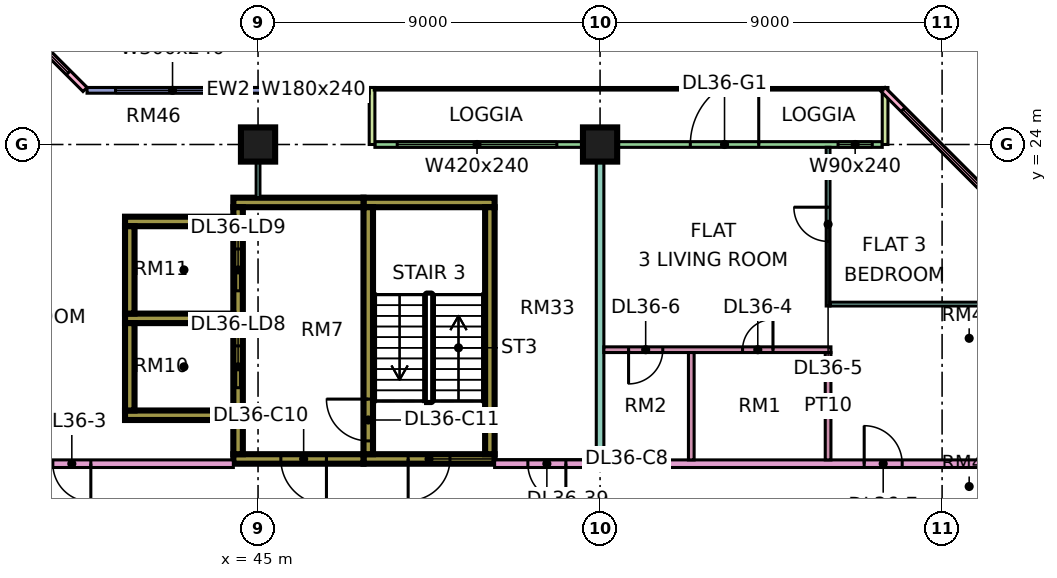
"""IFC4 building model, lengths in metres.
Left out: names, types, materials, properties, quantities, classifications, styles, units other than length and angle.
Written with IfcOpenShell. Run it as: python <this file> out.ifc"""

import sys

from ifc_helpers import new_model, si_unit, direction, frame, frame_2d, origin, origin_2d, place, context, subcontext, project, spatial, rectangle, extrude, element, fill, save


model = new_model("IFC4")
c1 = context("Model", 3, precision=1e-05, world=origin(), true_north=direction((0.0, 1.0)))
c2 = subcontext(c1, "Body", "Model", "MODEL_VIEW")
j1 = project(units=[si_unit("LENGTHUNIT", "METRE"), si_unit("PLANEANGLEUNIT", "RADIAN")], contexts=[c1])
p1 = place(None, origin())
s1 = spatial("IfcSite", under=j1, at=p1, CompositionType="ELEMENT")
p2 = place(p1, origin())
s2 = spatial("IfcBuilding", under=s1, at=p2, CompositionType="ELEMENT")
p3 = place(p2, frame((0.0, 0.0, 161.15)))
s3 = spatial("IfcBuildingStorey", under=s2, at=p3, CompositionType="ELEMENT", Elevation=161.15)
for number, where, z_axis, x_axis in (
    (1, (45.0, 24.0, 0.0), (0.0, 0.0, 1.0), (1.0, 0.0, 0.0)),
    (2, (54.0, 24.0, 0.0), (0.0, 0.0, 1.0), (1.0, 0.0, 0.0)),
):
    element("IfcColumn", number, at=place(p3, frame(where, z_axis=z_axis, x_axis=x_axis)), inside=s3, PredefinedType="COLUMN", context=c2, shape_type="SweptSolid", body=[
        extrude(rectangle(XDim=0.9, YDim=0.9, at=origin_2d()), origin(), (0.0, 0.0, 1.0), 3.75),
    ])
p4 = place(p3, frame((47.775, 15.725, 0.0), z_axis=(0.0, 0.0, 1.0), x_axis=(1.0, 0.0, 0.0)))
e3 = element("IfcWall", 3, at=p4, inside=s3, PredefinedType="SHEAR", context=c2, shape_type="SweptSolid", body=[
    extrude(rectangle(XDim=3.45, YDim=0.25, at=frame_2d((1.725, 0.0))), origin(), (0.0, 0.0, 1.0), 3.75),
])
p5 = place(p4, frame((1.175, 0.0, 0.0)))
e4 = element("IfcOpeningElement", 4, at=p5, cuts=e3, PredefinedType="OPENING", context=c2, shape_type="SweptSolid", body=[
    extrude(rectangle(XDim=1.1, YDim=2.2, at=frame_2d((0.55, 1.1))), frame((0.0, 0.135, 0.0), z_axis=(0.0, -1.0, 0.0), x_axis=(1.0, 0.0, 0.0)), (0.0, 0.0, 1.0), 0.27),
])
p6 = place(p3, frame((47.775, 22.475, 0.0), z_axis=(0.0, 0.0, 1.0), x_axis=(1.0, 0.0, 0.0)))
e5 = element("IfcWall", 5, at=p6, inside=s3, PredefinedType="SHEAR", context=c2, shape_type="SweptSolid", body=[
    extrude(rectangle(XDim=3.45, YDim=0.25, at=frame_2d((1.725, 0.0))), origin(), (0.0, 0.0, 1.0), 3.75),
])
p7 = place(p3, frame((47.9, 15.85, 0.0), z_axis=(0.0, 0.0, 1.0), x_axis=(0.0, 1.0, 0.0)))
e6 = element("IfcWall", 6, at=p7, inside=s3, PredefinedType="SHEAR", context=c2, shape_type="SweptSolid", body=[
    extrude(rectangle(XDim=6.5, YDim=0.25, at=frame_2d((3.25, 0.0))), origin(), (0.0, 0.0, 1.0), 3.75),
])
p8 = place(p7, frame((0.35, 0.0, 0.0)))
e7 = element("IfcOpeningElement", 7, at=p8, cuts=e6, PredefinedType="OPENING", context=c2, shape_type="SweptSolid", body=[
    extrude(rectangle(XDim=1.1, YDim=2.2, at=frame_2d((0.55, 1.1))), frame((0.0, 0.135, 0.0), z_axis=(0.0, -1.0, 0.0), x_axis=(1.0, 0.0, 0.0)), (0.0, 0.0, 1.0), 0.27),
])
p9 = place(p3, frame((51.1, 15.85, 0.0), z_axis=(0.0, 0.0, 1.0), x_axis=(0.0, 1.0, 0.0)))
e8 = element("IfcWall", 8, at=p9, inside=s3, PredefinedType="SHEAR", context=c2, shape_type="SweptSolid", body=[
    extrude(rectangle(XDim=6.5, YDim=0.25, at=frame_2d((3.25, 0.0))), origin(), (0.0, 0.0, 1.0), 3.75),
])
p10 = place(p3, frame((44.35, 15.725, 0.0), z_axis=(0.0, 0.0, 1.0), x_axis=(1.0, 0.0, 0.0)))
e9 = element("IfcWall", 9, at=p10, inside=s3, PredefinedType="SHEAR", context=c2, shape_type="SweptSolid", body=[
    extrude(rectangle(XDim=3.425, YDim=0.25, at=frame_2d((1.712, 0.0))), origin(), (0.0, 0.0, 1.0), 3.75),
])
p11 = place(p10, frame((1.25, 0.0, 0.0)))
e10 = element("IfcOpeningElement", 10, at=p11, cuts=e9, PredefinedType="OPENING", context=c2, shape_type="SweptSolid", body=[
    extrude(rectangle(XDim=1.2, YDim=2.2, at=frame_2d((0.6, 1.1))), frame((0.0, 0.135, 0.0), z_axis=(0.0, -1.0, 0.0), x_axis=(1.0, 0.0, 0.0)), (0.0, 0.0, 1.0), 0.27),
])
p12 = place(p3, frame((44.35, 22.475, 0.0), z_axis=(0.0, 0.0, 1.0), x_axis=(1.0, 0.0, 0.0)))
e11 = element("IfcWall", 11, at=p12, inside=s3, PredefinedType="SHEAR", context=c2, shape_type="SweptSolid", body=[
    extrude(rectangle(XDim=3.425, YDim=0.25, at=frame_2d((1.712, 0.0))), origin(), (0.0, 0.0, 1.0), 3.75),
])
p13 = place(p3, frame((44.475, 15.85, 0.0), z_axis=(0.0, 0.0, 1.0), x_axis=(0.0, 1.0, 0.0)))
e12 = element("IfcWall", 12, at=p13, inside=s3, PredefinedType="SHEAR", context=c2, shape_type="SweptSolid", body=[
    extrude(rectangle(XDim=6.5, YDim=0.25, at=frame_2d((3.25, 0.0))), origin(), (0.0, 0.0, 1.0), 3.75),
])
p14 = place(p13, frame((1.75, 0.0, 0.0)))
e13 = element("IfcOpeningElement", 13, at=p14, cuts=e12, PredefinedType="OPENING", context=c2, shape_type="SweptSolid", body=[
    extrude(rectangle(XDim=1.1, YDim=2.2, at=frame_2d((0.55, 1.1))), frame((0.0, 0.135, 0.0), z_axis=(0.0, -1.0, 0.0), x_axis=(1.0, 0.0, 0.0)), (0.0, 0.0, 1.0), 0.27),
])
p15 = place(p13, frame((4.3, 0.0, 0.0)))
e14 = element("IfcOpeningElement", 14, at=p15, cuts=e12, PredefinedType="OPENING", context=c2, shape_type="SweptSolid", body=[
    extrude(rectangle(XDim=1.1, YDim=2.2, at=frame_2d((0.55, 1.1))), frame((0.0, 0.135, 0.0), z_axis=(0.0, -1.0, 0.0), x_axis=(1.0, 0.0, 0.0)), (0.0, 0.0, 1.0), 0.27),
])
for number, where, z_axis, x_axis in (
    (15, (41.5, 16.875, 0.0), (0.0, 0.0, 1.0), (1.0, 0.0, 0.0)),
    (16, (41.5, 19.425, 0.0), (0.0, 0.0, 1.0), (1.0, 0.0, 0.0)),
    (17, (41.5, 21.975, 0.0), (0.0, 0.0, 1.0), (1.0, 0.0, 0.0)),
):
    element("IfcWall", number, at=place(p3, frame(where, z_axis=z_axis, x_axis=x_axis)), inside=s3, PredefinedType="SHEAR", context=c2, shape_type="SweptSolid", body=[
        extrude(rectangle(XDim=2.85, YDim=0.25, at=frame_2d((1.425, 0.0))), origin(), (0.0, 0.0, 1.0), 3.75),
    ])
for number, where, z_axis, x_axis in (
    (18, (41.625, 17.0, 0.0), (0.0, 0.0, 1.0), (0.0, 1.0, 0.0)),
    (19, (41.625, 19.55, 0.0), (0.0, 0.0, 1.0), (0.0, 1.0, 0.0)),
):
    element("IfcWall", number, at=place(p3, frame(where, z_axis=z_axis, x_axis=x_axis)), inside=s3, PredefinedType="SHEAR", context=c2, shape_type="SweptSolid", body=[
        extrude(rectangle(XDim=2.3, YDim=0.25, at=frame_2d((1.15, 0.0))), origin(), (0.0, 0.0, 1.0), 3.75),
    ])
p16 = place(p3, frame((61.425, 24.0, 0.0), z_axis=(0.0, 0.0, 1.0), x_axis=(-1.0, 0.0, 0.0)))
e20 = element("IfcWall", 20, at=p16, inside=s3, PredefinedType="SOLIDWALL", context=c2, shape_type="SweptSolid", body=[
    extrude(rectangle(XDim=13.35, YDim=0.15, at=frame_2d((6.675, 0.0))), origin(), (0.0, 0.0, 1.0), 3.35),
])
p17 = place(p16, frame((0.262, 0.0, 0.45)))
e21 = element("IfcOpeningElement", 21, at=p17, cuts=e20, PredefinedType="OPENING", context=c2, shape_type="SweptSolid", body=[
    extrude(rectangle(XDim=0.9, YDim=2.4, at=frame_2d((0.45, 1.2))), frame((0.0, 0.085, 0.0), z_axis=(0.0, -1.0, 0.0), x_axis=(1.0, 0.0, 0.0)), (0.0, 0.0, 1.0), 0.17),
])
p18 = place(p16, frame((3.25, 0.0, 0.0)))
e22 = element("IfcOpeningElement", 22, at=p18, cuts=e20, PredefinedType="OPENING", context=c2, shape_type="SweptSolid", body=[
    extrude(rectangle(XDim=1.8, YDim=2.4, at=frame_2d((0.9, 1.2))), frame((0.0, 0.085, 0.0), z_axis=(0.0, -1.0, 0.0), x_axis=(1.0, 0.0, 0.0)), (0.0, 0.0, 1.0), 0.17),
])
p19 = place(p16, frame((8.562, 0.0, 0.45)))
e23 = element("IfcOpeningElement", 23, at=p19, cuts=e20, PredefinedType="OPENING", context=c2, shape_type="SweptSolid", body=[
    extrude(rectangle(XDim=4.2, YDim=2.4, at=frame_2d((2.1, 1.2))), frame((0.0, 0.085, 0.0), z_axis=(0.0, -1.0, 0.0), x_axis=(1.0, 0.0, 0.0)), (0.0, 0.0, 1.0), 0.17),
])
for number, where, z_axis, x_axis in (
    (24, (61.5, 25.5, 0.0), (0.0, 0.0, 1.0), (0.0, -1.0, 0.0)),
    (25, (48.0, 25.5, 0.0), (0.0, 0.0, 1.0), (0.0, -1.0, 0.0)),
):
    element("IfcWall", number, at=place(p3, frame(where, z_axis=z_axis, x_axis=x_axis)), inside=s3, PredefinedType="SOLIDWALL", context=c2, shape_type="SweptSolid", body=[
        extrude(rectangle(XDim=1.5, YDim=0.15, at=frame_2d((0.75, 0.0))), origin(), (0.0, 0.0, 1.0), 3.35),
    ])
p20 = place(p3, frame((47.925, 25.425, 0.0), z_axis=(0.0, 0.0, 1.0), x_axis=(-1.0, 0.0, 0.0)))
e26 = element("IfcWall", 26, at=p20, inside=s3, PredefinedType="SOLIDWALL", context=c2, shape_type="SweptSolid", body=[
    extrude(rectangle(XDim=7.425, YDim=0.15, at=frame_2d((3.712, 0.0))), origin(), (0.0, 0.0, 1.0), 3.35),
])
p21 = place(p20, frame((0.562, 0.0, 0.45)))
e27 = element("IfcOpeningElement", 27, at=p21, cuts=e26, PredefinedType="OPENING", context=c2, shape_type="SweptSolid", body=[
    extrude(rectangle(XDim=1.8, YDim=2.4, at=frame_2d((0.9, 1.2))), frame((0.0, 0.085, 0.0), z_axis=(0.0, -1.0, 0.0), x_axis=(1.0, 0.0, 0.0)), (0.0, 0.0, 1.0), 0.17),
])
p22 = place(p20, frame((3.675, 0.0, 0.45)))
e28 = element("IfcOpeningElement", 28, at=p22, cuts=e26, PredefinedType="OPENING", context=c2, shape_type="SweptSolid", body=[
    extrude(rectangle(XDim=3.0, YDim=2.4, at=frame_2d((1.5, 1.2))), frame((0.0, 0.085, 0.0), z_axis=(0.0, -1.0, 0.0), x_axis=(1.0, 0.0, 0.0)), (0.0, 0.0, 1.0), 0.17),
])
p23 = place(p3, frame((40.447, 25.447, 0.0), z_axis=(0.0, 0.0, 1.0), x_axis=(-0.707106781187, 0.707106781187, 0.0)))
e29 = element("IfcWall", 29, at=p23, inside=s3, PredefinedType="SOLIDWALL", context=c2, shape_type="SweptSolid", body=[
    extrude(rectangle(XDim=4.243, YDim=0.15, at=frame_2d((2.121, 0.0))), origin(), (0.0, 0.0, 1.0), 3.35),
])
p24 = place(p23, frame((0.621, 0.0, 0.45)))
e30 = element("IfcOpeningElement", 30, at=p24, cuts=e29, PredefinedType="OPENING", context=c2, shape_type="SweptSolid", body=[
    extrude(rectangle(XDim=3.0, YDim=2.4, at=frame_2d((1.5, 1.2))), frame((0.0, 0.085, 0.0), z_axis=(0.0, -1.0, 0.0), x_axis=(1.0, 0.0, 0.0)), (0.0, 0.0, 1.0), 0.17),
])
p25 = place(p3, frame((64.447, 22.447, 0.0), z_axis=(0.0, 0.0, 1.0), x_axis=(-0.707106781187, 0.707106781187, 0.0)))
e31 = element("IfcWall", 31, at=p25, inside=s3, PredefinedType="SOLIDWALL", context=c2, shape_type="SweptSolid", body=[
    extrude(rectangle(XDim=4.243, YDim=0.15, at=frame_2d((2.121, 0.0))), origin(), (0.0, 0.0, 1.0), 3.35),
])
p26 = place(p25, frame((0.498, 0.0, 0.45)))
e32 = element("IfcOpeningElement", 32, at=p26, cuts=e31, PredefinedType="OPENING", context=c2, shape_type="SweptSolid", body=[
    extrude(rectangle(XDim=3.0, YDim=2.4, at=frame_2d((1.5, 1.2))), frame((0.0, 0.085, 0.0), z_axis=(0.0, -1.0, 0.0), x_axis=(1.0, 0.0, 0.0)), (0.0, 0.0, 1.0), 0.17),
])
p27 = place(p3, frame((34.0, 15.6, 0.0), z_axis=(0.0, 0.0, 1.0), x_axis=(1.0, 0.0, 0.0)))
e33 = element("IfcWall", 33, at=p27, inside=s3, PredefinedType="PARTITIONING", context=c2, shape_type="SweptSolid", body=[
    extrude(rectangle(XDim=10.35, YDim=0.2, at=frame_2d((5.175, 0.0))), origin(), (0.0, 0.0, 1.0), 3.35),
])
p28 = place(p27, frame((5.6, 0.0, 0.0)))
e34 = element("IfcOpeningElement", 34, at=p28, cuts=e33, PredefinedType="OPENING", context=c2, shape_type="SweptSolid", body=[
    extrude(rectangle(XDim=1.0, YDim=2.1, at=frame_2d((0.5, 1.05))), frame((0.0, 0.11, 0.0), z_axis=(0.0, -1.0, 0.0), x_axis=(1.0, 0.0, 0.0)), (0.0, 0.0, 1.0), 0.22),
])
p29 = place(p27, frame((0.45, 0.0, 0.0)))
e35 = element("IfcOpeningElement", 35, at=p29, cuts=e33, PredefinedType="OPENING", context=c2, shape_type="SweptSolid", body=[
    extrude(rectangle(XDim=1.2, YDim=2.1, at=frame_2d((0.6, 1.05))), frame((0.0, 0.11, 0.0), z_axis=(0.0, -1.0, 0.0), x_axis=(1.0, 0.0, 0.0)), (0.0, 0.0, 1.0), 0.22),
])
p30 = place(p3, frame((45.0, 22.6, 0.0), z_axis=(0.0, 0.0, 1.0), x_axis=(0.0, 1.0, 0.0)))
e36 = element("IfcWall", 36, at=p30, inside=s3, PredefinedType="PARTITIONING", context=c2, shape_type="SweptSolid", body=[
    extrude(rectangle(XDim=1.4, YDim=0.1, at=frame_2d((0.7, 0.0))), origin(), (0.0, 0.0, 1.0), 3.35),
])
p31 = place(p3, frame((51.225, 15.6, 0.0), z_axis=(0.0, 0.0, 1.0), x_axis=(1.0, 0.0, 0.0)))
e37 = element("IfcWall", 37, at=p31, inside=s3, PredefinedType="PARTITIONING", context=c2, shape_type="SweptSolid", body=[
    extrude(rectangle(XDim=13.125, YDim=0.2, at=frame_2d((6.562, 0.0))), origin(), (0.0, 0.0, 1.0), 3.35),
])
p32 = place(p31, frame((9.725, 0.0, 0.0)))
e38 = element("IfcOpeningElement", 38, at=p32, cuts=e37, PredefinedType="OPENING", context=c2, shape_type="SweptSolid", body=[
    extrude(rectangle(XDim=1.0, YDim=2.1, at=frame_2d((0.5, 1.05))), frame((0.0, 0.11, 0.0), z_axis=(0.0, -1.0, 0.0), x_axis=(1.0, 0.0, 0.0)), (0.0, 0.0, 1.0), 0.22),
])
p33 = place(p31, frame((0.875, 0.0, 0.0)))
e39 = element("IfcOpeningElement", 39, at=p33, cuts=e37, PredefinedType="OPENING", context=c2, shape_type="SweptSolid", body=[
    extrude(rectangle(XDim=1.0, YDim=2.1, at=frame_2d((0.5, 1.05))), frame((0.0, 0.11, 0.0), z_axis=(0.0, -1.0, 0.0), x_axis=(1.0, 0.0, 0.0)), (0.0, 0.0, 1.0), 0.22),
])
p34 = place(p3, frame((54.0, 15.7, 0.0), z_axis=(0.0, 0.0, 1.0), x_axis=(0.0, 1.0, 0.0)))
e40 = element("IfcWall", 40, at=p34, inside=s3, PredefinedType="PARTITIONING", context=c2, shape_type="SweptSolid", body=[
    extrude(rectangle(XDim=8.226, YDim=0.2, at=frame_2d((4.113, 0.0))), origin(), (0.0, 0.0, 1.0), 3.35),
])
p35 = place(p3, frame((54.1, 18.6, 0.0), z_axis=(0.0, 0.0, 1.0), x_axis=(1.0, 0.0, 0.0)))
e41 = element("IfcWall", 41, at=p35, inside=s3, PredefinedType="PARTITIONING", context=c2, shape_type="SweptSolid", body=[
    extrude(rectangle(XDim=5.975, YDim=0.15, at=frame_2d((2.987, 0.0))), origin(), (0.0, 0.0, 1.0), 3.35),
])
p36 = place(p35, frame((3.65, 0.0, 0.0)))
e42 = element("IfcOpeningElement", 42, at=p36, cuts=e41, PredefinedType="OPENING", context=c2, shape_type="SweptSolid", body=[
    extrude(rectangle(XDim=0.8, YDim=2.1, at=frame_2d((0.4, 1.05))), frame((0.0, 0.085, 0.0), z_axis=(0.0, -1.0, 0.0), x_axis=(1.0, 0.0, 0.0)), (0.0, 0.0, 1.0), 0.17),
])
p37 = place(p35, frame((0.65, 0.0, 0.0)))
e43 = element("IfcOpeningElement", 43, at=p37, cuts=e41, PredefinedType="OPENING", context=c2, shape_type="SweptSolid", body=[
    extrude(rectangle(XDim=0.9, YDim=2.1, at=frame_2d((0.45, 1.05))), frame((0.0, 0.085, 0.0), z_axis=(0.0, -1.0, 0.0), x_axis=(1.0, 0.0, 0.0)), (0.0, 0.0, 1.0), 0.17),
])
for number, where, z_axis, x_axis in (
    (44, (56.4, 15.7, 0.0), (0.0, 0.0, 1.0), (0.0, 1.0, 0.0)),
    (45, (60.0, 15.7, 0.0), (0.0, 0.0, 1.0), (0.0, 1.0, 0.0)),
):
    element("IfcWall", number, at=place(p3, frame(where, z_axis=z_axis, x_axis=x_axis)), inside=s3, PredefinedType="PARTITIONING", context=c2, shape_type="SweptSolid", body=[
        extrude(rectangle(XDim=2.825, YDim=0.15, at=frame_2d((1.413, 0.0))), origin(), (0.0, 0.0, 1.0), 3.35),
    ])
p38 = place(p3, frame((60.0, 19.75, 0.0), z_axis=(0.0, 0.0, 1.0), x_axis=(0.0, 1.0, 0.0)))
e46 = element("IfcWall", 46, at=p38, inside=s3, PredefinedType="PARTITIONING", context=c2, shape_type="SweptSolid", body=[
    extrude(rectangle(XDim=4.176, YDim=0.1, at=frame_2d((2.088, 0.0))), origin(), (0.0, 0.0, 1.0), 3.35),
])
p39 = place(p38, frame((1.7, 0.0, 0.0)))
e47 = element("IfcOpeningElement", 47, at=p39, cuts=e46, PredefinedType="OPENING", context=c2, shape_type="SweptSolid", body=[
    extrude(rectangle(XDim=0.9, YDim=2.1, at=frame_2d((0.45, 1.05))), frame((0.0, 0.06, 0.0), z_axis=(0.0, -1.0, 0.0), x_axis=(1.0, 0.0, 0.0)), (0.0, 0.0, 1.0), 0.12),
])
p40 = place(p3, frame((60.05, 19.8, 0.0), z_axis=(0.0, 0.0, 1.0), x_axis=(1.0, 0.0, 0.0)))
e48 = element("IfcWall", 48, at=p40, inside=s3, PredefinedType="PARTITIONING", context=c2, shape_type="SweptSolid", body=[
    extrude(rectangle(XDim=4.3, YDim=0.1, at=frame_2d((2.15, 0.0))), origin(), (0.0, 0.0, 1.0), 3.35),
])
p41 = place(p17, origin())
e49 = element("IfcWindow", 49, at=p41, inside=s3, PartitioningType="SINGLE_PANEL", PredefinedType="WINDOW", context=c2, shape_type="SweptSolid", body=[
    extrude(rectangle(XDim=0.9, YDim=2.4, at=frame_2d((0.45, 1.2))), frame((0.0, 0.03, 0.0), z_axis=(0.0, -1.0, 0.0), x_axis=(1.0, 0.0, 0.0)), (0.0, 0.0, 1.0), 0.06),
])
fill(e21, e49)
p42 = place(p18, frame((1.8, 0.0, 0.0), z_axis=(0.0, 0.0, 1.0), x_axis=(-1.0, 0.0, 0.0)))
e50 = element("IfcDoor", 50, at=p42, inside=s3, OperationType="DOUBLE_DOOR_SINGLE_SWING", PredefinedType="DOOR", context=c2, shape_type="SweptSolid", body=[
    extrude(rectangle(XDim=1.8, YDim=2.4, at=frame_2d((0.9, 1.2))), frame((0.0, 0.025, 0.0), z_axis=(0.0, -1.0, 0.0), x_axis=(1.0, 0.0, 0.0)), (0.0, 0.0, 1.0), 0.05),
])
fill(e22, e50)
p43 = place(p19, origin())
e51 = element("IfcWindow", 51, at=p43, inside=s3, PartitioningType="SINGLE_PANEL", PredefinedType="WINDOW", context=c2, shape_type="SweptSolid", body=[
    extrude(rectangle(XDim=4.2, YDim=2.4, at=frame_2d((2.1, 1.2))), frame((0.0, 0.03, 0.0), z_axis=(0.0, -1.0, 0.0), x_axis=(1.0, 0.0, 0.0)), (0.0, 0.0, 1.0), 0.06),
])
fill(e23, e51)
p44 = place(p21, origin())
e52 = element("IfcWindow", 52, at=p44, inside=s3, PartitioningType="SINGLE_PANEL", PredefinedType="WINDOW", context=c2, shape_type="SweptSolid", body=[
    extrude(rectangle(XDim=1.8, YDim=2.4, at=frame_2d((0.9, 1.2))), frame((0.0, 0.03, 0.0), z_axis=(0.0, -1.0, 0.0), x_axis=(1.0, 0.0, 0.0)), (0.0, 0.0, 1.0), 0.06),
])
fill(e27, e52)
p45 = place(p22, origin())
e53 = element("IfcWindow", 53, at=p45, inside=s3, PartitioningType="SINGLE_PANEL", PredefinedType="WINDOW", context=c2, shape_type="SweptSolid", body=[
    extrude(rectangle(XDim=3.0, YDim=2.4, at=frame_2d((1.5, 1.2))), frame((0.0, 0.03, 0.0), z_axis=(0.0, -1.0, 0.0), x_axis=(1.0, 0.0, 0.0)), (0.0, 0.0, 1.0), 0.06),
])
fill(e28, e53)
p46 = place(p24, origin())
e54 = element("IfcWindow", 54, at=p46, inside=s3, PartitioningType="SINGLE_PANEL", PredefinedType="WINDOW", context=c2, shape_type="SweptSolid", body=[
    extrude(rectangle(XDim=3.0, YDim=2.4, at=frame_2d((1.5, 1.2))), frame((0.0, 0.03, 0.0), z_axis=(0.0, -1.0, 0.0), x_axis=(1.0, 0.0, 0.0)), (0.0, 0.0, 1.0), 0.06),
])
fill(e30, e54)
p47 = place(p26, origin())
e55 = element("IfcWindow", 55, at=p47, inside=s3, PartitioningType="SINGLE_PANEL", PredefinedType="WINDOW", context=c2, shape_type="SweptSolid", body=[
    extrude(rectangle(XDim=3.0, YDim=2.4, at=frame_2d((1.5, 1.2))), frame((0.0, 0.03, 0.0), z_axis=(0.0, -1.0, 0.0), x_axis=(1.0, 0.0, 0.0)), (0.0, 0.0, 1.0), 0.06),
])
fill(e32, e55)
p48 = place(p5, frame((1.1, 0.0, 0.0), z_axis=(0.0, 0.0, 1.0), x_axis=(-1.0, 0.0, 0.0)))
e56 = element("IfcDoor", 56, at=p48, inside=s3, OperationType="SINGLE_SWING_LEFT", PredefinedType="DOOR", context=c2, shape_type="SweptSolid", body=[
    extrude(rectangle(XDim=1.1, YDim=2.2, at=frame_2d((0.55, 1.1))), frame((0.0, 0.025, 0.0), z_axis=(0.0, -1.0, 0.0), x_axis=(1.0, 0.0, 0.0)), (0.0, 0.0, 1.0), 0.05),
])
fill(e4, e56)
p49 = place(p11, origin())
e57 = element("IfcDoor", 57, at=p49, inside=s3, OperationType="SINGLE_SWING_RIGHT", PredefinedType="DOOR", context=c2, shape_type="SweptSolid", body=[
    extrude(rectangle(XDim=1.2, YDim=2.2, at=frame_2d((0.6, 1.1))), frame((0.0, 0.025, 0.0), z_axis=(0.0, -1.0, 0.0), x_axis=(1.0, 0.0, 0.0)), (0.0, 0.0, 1.0), 0.05),
])
fill(e10, e57)
p50 = place(p8, frame((1.1, 0.0, 0.0), z_axis=(0.0, 0.0, 1.0), x_axis=(-1.0, 0.0, 0.0)))
e58 = element("IfcDoor", 58, at=p50, inside=s3, OperationType="SINGLE_SWING_RIGHT", PredefinedType="DOOR", context=c2, shape_type="SweptSolid", body=[
    extrude(rectangle(XDim=1.1, YDim=2.2, at=frame_2d((0.55, 1.1))), frame((0.0, 0.025, 0.0), z_axis=(0.0, -1.0, 0.0), x_axis=(1.0, 0.0, 0.0)), (0.0, 0.0, 1.0), 0.05),
])
fill(e7, e58)
p51 = place(p14, origin())
e59 = element("IfcDoor", 59, at=p51, inside=s3, OperationType="DOUBLE_DOOR_SLIDING", PredefinedType="DOOR", context=c2, shape_type="SweptSolid", body=[
    extrude(rectangle(XDim=1.1, YDim=2.2, at=frame_2d((0.55, 1.1))), frame((0.0, 0.025, 0.0), z_axis=(0.0, -1.0, 0.0), x_axis=(1.0, 0.0, 0.0)), (0.0, 0.0, 1.0), 0.05),
])
fill(e13, e59)
p52 = place(p15, origin())
e60 = element("IfcDoor", 60, at=p52, inside=s3, OperationType="DOUBLE_DOOR_SLIDING", PredefinedType="DOOR", context=c2, shape_type="SweptSolid", body=[
    extrude(rectangle(XDim=1.1, YDim=2.2, at=frame_2d((0.55, 1.1))), frame((0.0, 0.025, 0.0), z_axis=(0.0, -1.0, 0.0), x_axis=(1.0, 0.0, 0.0)), (0.0, 0.0, 1.0), 0.05),
])
fill(e14, e60)
p53 = place(p28, origin())
e61 = element("IfcDoor", 61, at=p53, inside=s3, OperationType="SINGLE_SWING_RIGHT", PredefinedType="DOOR", context=c2, shape_type="SweptSolid", body=[
    extrude(rectangle(XDim=1.0, YDim=2.1, at=frame_2d((0.5, 1.05))), frame((0.0, 0.025, 0.0), z_axis=(0.0, -1.0, 0.0), x_axis=(1.0, 0.0, 0.0)), (0.0, 0.0, 1.0), 0.05),
])
fill(e34, e61)
p54 = place(p36, frame((0.8, 0.0, 0.0), z_axis=(0.0, 0.0, 1.0), x_axis=(-1.0, 0.0, 0.0)))
e62 = element("IfcDoor", 62, at=p54, inside=s3, OperationType="SINGLE_SWING_RIGHT", PredefinedType="DOOR", context=c2, shape_type="SweptSolid", body=[
    extrude(rectangle(XDim=0.8, YDim=2.1, at=frame_2d((0.4, 1.05))), frame((0.0, 0.025, 0.0), z_axis=(0.0, -1.0, 0.0), x_axis=(1.0, 0.0, 0.0)), (0.0, 0.0, 1.0), 0.05),
])
fill(e42, e62)
p55 = place(p39, frame((0.9, 0.0, 0.0), z_axis=(0.0, 0.0, 1.0), x_axis=(-1.0, 0.0, 0.0)))
e63 = element("IfcDoor", 63, at=p55, inside=s3, OperationType="SINGLE_SWING_RIGHT", PredefinedType="DOOR", context=c2, shape_type="SweptSolid", body=[
    extrude(rectangle(XDim=0.9, YDim=2.1, at=frame_2d((0.45, 1.05))), frame((0.0, 0.025, 0.0), z_axis=(0.0, -1.0, 0.0), x_axis=(1.0, 0.0, 0.0)), (0.0, 0.0, 1.0), 0.05),
])
fill(e47, e63)
p56 = place(p37, frame((0.9, 0.0, 0.0), z_axis=(0.0, 0.0, 1.0), x_axis=(-1.0, 0.0, 0.0)))
e64 = element("IfcDoor", 64, at=p56, inside=s3, OperationType="SINGLE_SWING_LEFT", PredefinedType="DOOR", context=c2, shape_type="SweptSolid", body=[
    extrude(rectangle(XDim=0.9, YDim=2.1, at=frame_2d((0.45, 1.05))), frame((0.0, 0.025, 0.0), z_axis=(0.0, -1.0, 0.0), x_axis=(1.0, 0.0, 0.0)), (0.0, 0.0, 1.0), 0.05),
])
fill(e43, e64)
p57 = place(p32, origin())
e65 = element("IfcDoor", 65, at=p57, inside=s3, OperationType="SINGLE_SWING_LEFT", PredefinedType="DOOR", context=c2, shape_type="SweptSolid", body=[
    extrude(rectangle(XDim=1.0, YDim=2.1, at=frame_2d((0.5, 1.05))), frame((0.0, 0.025, 0.0), z_axis=(0.0, -1.0, 0.0), x_axis=(1.0, 0.0, 0.0)), (0.0, 0.0, 1.0), 0.05),
])
fill(e38, e65)
p58 = place(p33, origin())
e66 = element("IfcDoor", 66, at=p58, inside=s3, OperationType="SINGLE_SWING_RIGHT", PredefinedType="DOOR", context=c2, shape_type="SweptSolid", body=[
    extrude(rectangle(XDim=1.0, YDim=2.1, at=frame_2d((0.5, 1.05))), frame((0.0, 0.025, 0.0), z_axis=(0.0, -1.0, 0.0), x_axis=(1.0, 0.0, 0.0)), (0.0, 0.0, 1.0), 0.05),
])
fill(e39, e66)
save(model, sys.argv[1])
